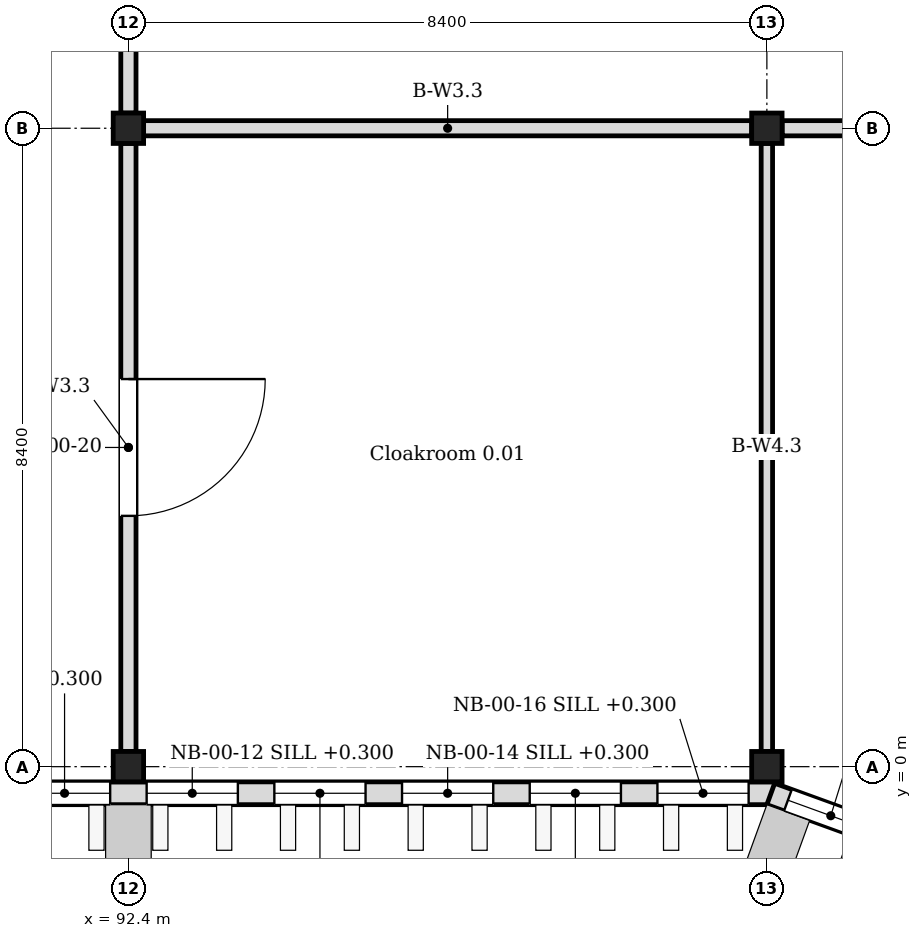
"""IFC4 building model, lengths in metres.
Left out: names, types, materials, properties, quantities, classifications, styles, units other than length and angle.
Written with IfcOpenShell. Run it as: python <this file> out.ifc"""

import sys

from ifc_helpers import new_model, si_unit, direction, frame, frame_2d, origin, origin_2d, place, context, subcontext, project, spatial, rectangle, i_section, extrude, element, fill, save


model = new_model("IFC4")
c1 = context("Model", 3, precision=1e-05, world=origin(), true_north=direction((0.0, 1.0)))
c2 = subcontext(c1, "Body", "Model", "MODEL_VIEW")
j1 = project(units=[si_unit("LENGTHUNIT", "METRE"), si_unit("PLANEANGLEUNIT", "RADIAN")], contexts=[c1])
p1 = place(None, origin())
s1 = spatial("IfcSite", under=j1, at=p1, CompositionType="ELEMENT")
p2 = place(p1, origin())
s2 = spatial("IfcBuilding", under=s1, at=p2, CompositionType="ELEMENT")
p3 = place(p2, origin())
s3 = spatial("IfcBuildingStorey", under=s2, at=p3, CompositionType="ELEMENT", Elevation=0.0)
for number, where, z_axis, x_axis in (
    (1, (92.4, 0.0, 0.0), (0.0, 0.0, 1.0), (1.0, 0.0, 0.0)),
    (2, (92.4, 8.4, 0.0), (0.0, 0.0, 1.0), (1.0, 0.0, 0.0)),
    (3, (100.8, 0.0, 0.0), (0.0, 0.0, 1.0), (1.0, 0.0, 0.0)),
    (4, (100.8, 8.4, 0.0), (0.0, 0.0, 1.0), (1.0, 0.0, 0.0)),
):
    element("IfcColumn", number, at=place(p3, frame(where, z_axis=z_axis, x_axis=x_axis)), inside=s3, PredefinedType="COLUMN", context=c2, shape_type="SweptSolid", body=[
        extrude(i_section(OverallWidth=0.4, OverallDepth=0.4, WebThickness=0.013, FlangeThickness=0.021, FilletRadius=0.022, at=origin_2d()), origin(), (0.0, 0.0, 1.0), 6.0),
    ])
p4 = place(p3, frame((67.1, -0.35, 0.0), z_axis=(0.0, 0.0, 1.0), x_axis=(1.0, 0.0, 0.0)))
e5 = element("IfcWall", 5, at=p4, inside=s3, PredefinedType="SOLIDWALL", context=c2, shape_type="SweptSolid", body=[
    extrude(rectangle(XDim=33.8, YDim=0.3, at=frame_2d((16.9, 0.0))), origin(), (0.0, 0.0, 1.0), 5.85),
])
p5 = place(p4, frame((3.1, 0.0, 0.0)))
e6 = element("IfcOpeningElement", 6, at=p5, cuts=e5, PredefinedType="OPENING", context=c2, shape_type="SweptSolid", body=[
    extrude(rectangle(XDim=2.4, YDim=2.6, at=frame_2d((1.2, 1.3))), frame((0.0, 0.16, 0.0), z_axis=(0.0, -1.0, 0.0), x_axis=(1.0, 0.0, 0.0)), (0.0, 0.0, 1.0), 0.32),
])
p6 = place(p4, frame((11.5, 0.0, 0.0)))
e7 = element("IfcOpeningElement", 7, at=p6, cuts=e5, PredefinedType="OPENING", context=c2, shape_type="SweptSolid", body=[
    extrude(rectangle(XDim=2.4, YDim=2.6, at=frame_2d((1.2, 1.3))), frame((0.0, 0.16, 0.0), z_axis=(0.0, -1.0, 0.0), x_axis=(1.0, 0.0, 0.0)), (0.0, 0.0, 1.0), 0.32),
])
p7 = place(p4, frame((19.9, 0.0, 0.0)))
e8 = element("IfcOpeningElement", 8, at=p7, cuts=e5, PredefinedType="OPENING", context=c2, shape_type="SweptSolid", body=[
    extrude(rectangle(XDim=2.4, YDim=2.6, at=frame_2d((1.2, 1.3))), frame((0.0, 0.16, 0.0), z_axis=(0.0, -1.0, 0.0), x_axis=(1.0, 0.0, 0.0)), (0.0, 0.0, 1.0), 0.32),
])
p8 = place(p4, frame((0.34, 0.0, 0.3)))
e9 = element("IfcOpeningElement", 9, at=p8, cuts=e5, PredefinedType="OPENING", context=c2, shape_type="SweptSolid", body=[
    extrude(rectangle(XDim=1.2, YDim=4.2, at=frame_2d((0.6, 2.1))), frame((0.0, 0.16, 0.0), z_axis=(0.0, -1.0, 0.0), x_axis=(1.0, 0.0, 0.0)), (0.0, 0.0, 1.0), 0.32),
])
p9 = place(p4, frame((7.06, 0.0, 0.3)))
e10 = element("IfcOpeningElement", 10, at=p9, cuts=e5, PredefinedType="OPENING", context=c2, shape_type="SweptSolid", body=[
    extrude(rectangle(XDim=1.2, YDim=4.2, at=frame_2d((0.6, 2.1))), frame((0.0, 0.16, 0.0), z_axis=(0.0, -1.0, 0.0), x_axis=(1.0, 0.0, 0.0)), (0.0, 0.0, 1.0), 0.32),
])
p10 = place(p4, frame((8.74, 0.0, 0.3)))
e11 = element("IfcOpeningElement", 11, at=p10, cuts=e5, PredefinedType="OPENING", context=c2, shape_type="SweptSolid", body=[
    extrude(rectangle(XDim=1.2, YDim=4.2, at=frame_2d((0.6, 2.1))), frame((0.0, 0.16, 0.0), z_axis=(0.0, -1.0, 0.0), x_axis=(1.0, 0.0, 0.0)), (0.0, 0.0, 1.0), 0.32),
])
p11 = place(p4, frame((15.46, 0.0, 0.3)))
e12 = element("IfcOpeningElement", 12, at=p11, cuts=e5, PredefinedType="OPENING", context=c2, shape_type="SweptSolid", body=[
    extrude(rectangle(XDim=1.2, YDim=4.2, at=frame_2d((0.6, 2.1))), frame((0.0, 0.16, 0.0), z_axis=(0.0, -1.0, 0.0), x_axis=(1.0, 0.0, 0.0)), (0.0, 0.0, 1.0), 0.32),
])
p12 = place(p4, frame((17.14, 0.0, 0.3)))
e13 = element("IfcOpeningElement", 13, at=p12, cuts=e5, PredefinedType="OPENING", context=c2, shape_type="SweptSolid", body=[
    extrude(rectangle(XDim=1.2, YDim=4.2, at=frame_2d((0.6, 2.1))), frame((0.0, 0.16, 0.0), z_axis=(0.0, -1.0, 0.0), x_axis=(1.0, 0.0, 0.0)), (0.0, 0.0, 1.0), 0.32),
])
p13 = place(p4, frame((23.86, 0.0, 0.3)))
e14 = element("IfcOpeningElement", 14, at=p13, cuts=e5, PredefinedType="OPENING", context=c2, shape_type="SweptSolid", body=[
    extrude(rectangle(XDim=1.2, YDim=4.2, at=frame_2d((0.6, 2.1))), frame((0.0, 0.16, 0.0), z_axis=(0.0, -1.0, 0.0), x_axis=(1.0, 0.0, 0.0)), (0.0, 0.0, 1.0), 0.32),
])
p14 = place(p4, frame((25.54, 0.0, 0.3)))
e15 = element("IfcOpeningElement", 15, at=p14, cuts=e5, PredefinedType="OPENING", context=c2, shape_type="SweptSolid", body=[
    extrude(rectangle(XDim=1.2, YDim=4.2, at=frame_2d((0.6, 2.1))), frame((0.0, 0.16, 0.0), z_axis=(0.0, -1.0, 0.0), x_axis=(1.0, 0.0, 0.0)), (0.0, 0.0, 1.0), 0.32),
])
p15 = place(p4, frame((27.22, 0.0, 0.3)))
e16 = element("IfcOpeningElement", 16, at=p15, cuts=e5, PredefinedType="OPENING", context=c2, shape_type="SweptSolid", body=[
    extrude(rectangle(XDim=1.2, YDim=4.2, at=frame_2d((0.6, 2.1))), frame((0.0, 0.16, 0.0), z_axis=(0.0, -1.0, 0.0), x_axis=(1.0, 0.0, 0.0)), (0.0, 0.0, 1.0), 0.32),
])
p16 = place(p4, frame((28.9, 0.0, 0.3)))
e17 = element("IfcOpeningElement", 17, at=p16, cuts=e5, PredefinedType="OPENING", context=c2, shape_type="SweptSolid", body=[
    extrude(rectangle(XDim=1.2, YDim=4.2, at=frame_2d((0.6, 2.1))), frame((0.0, 0.16, 0.0), z_axis=(0.0, -1.0, 0.0), x_axis=(1.0, 0.0, 0.0)), (0.0, 0.0, 1.0), 0.32),
])
p17 = place(p4, frame((30.58, 0.0, 0.3)))
e18 = element("IfcOpeningElement", 18, at=p17, cuts=e5, PredefinedType="OPENING", context=c2, shape_type="SweptSolid", body=[
    extrude(rectangle(XDim=1.2, YDim=4.2, at=frame_2d((0.6, 2.1))), frame((0.0, 0.16, 0.0), z_axis=(0.0, -1.0, 0.0), x_axis=(1.0, 0.0, 0.0)), (0.0, 0.0, 1.0), 0.32),
])
p18 = place(p4, frame((32.26, 0.0, 0.3)))
e19 = element("IfcOpeningElement", 19, at=p18, cuts=e5, PredefinedType="OPENING", context=c2, shape_type="SweptSolid", body=[
    extrude(rectangle(XDim=1.2, YDim=4.2, at=frame_2d((0.6, 2.1))), frame((0.0, 0.16, 0.0), z_axis=(0.0, -1.0, 0.0), x_axis=(1.0, 0.0, 0.0)), (0.0, 0.0, 1.0), 0.32),
])
p19 = place(p3, frame((100.851, -0.359, 0.0), z_axis=(0.0, 0.0, 1.0), x_axis=(0.939953187971, -0.341303390584, 0.0)))
e20 = element("IfcWall", 20, at=p19, inside=s3, PredefinedType="SOLIDWALL", context=c2, shape_type="SweptSolid", body=[
    extrude(rectangle(XDim=8.828, YDim=0.3, at=frame_2d((4.414, 0.0))), origin(), (0.0, 0.0, 1.0), 5.85),
])
p20 = place(p19, frame((3.268, 0.0, 0.0)))
e21 = element("IfcOpeningElement", 21, at=p20, cuts=e20, PredefinedType="OPENING", context=c2, shape_type="SweptSolid", body=[
    extrude(rectangle(XDim=2.4, YDim=2.6, at=frame_2d((1.2, 1.3))), frame((0.0, 0.16, 0.0), z_axis=(0.0, -1.0, 0.0), x_axis=(1.0, 0.0, 0.0)), (0.0, 0.0, 1.0), 0.32),
])
p21 = place(p19, frame((0.24, 0.0, 0.3)))
e22 = element("IfcOpeningElement", 22, at=p21, cuts=e20, PredefinedType="OPENING", context=c2, shape_type="SweptSolid", body=[
    extrude(rectangle(XDim=1.2, YDim=4.2, at=frame_2d((0.6, 2.1))), frame((0.0, 0.16, 0.0), z_axis=(0.0, -1.0, 0.0), x_axis=(1.0, 0.0, 0.0)), (0.0, 0.0, 1.0), 0.32),
])
p22 = place(p19, frame((6.96, 0.0, 0.3)))
e23 = element("IfcOpeningElement", 23, at=p22, cuts=e20, PredefinedType="OPENING", context=c2, shape_type="SweptSolid", body=[
    extrude(rectangle(XDim=1.2, YDim=4.2, at=frame_2d((0.6, 2.1))), frame((0.0, 0.16, 0.0), z_axis=(0.0, -1.0, 0.0), x_axis=(1.0, 0.0, 0.0)), (0.0, 0.0, 1.0), 0.32),
])
p23 = place(p3, frame((92.6, 8.4, 0.0), z_axis=(0.0, 0.0, 1.0), x_axis=(1.0, 0.0, 0.0)))
e24 = element("IfcWall", 24, at=p23, inside=s3, PredefinedType="PARTITIONING", context=c2, shape_type="SweptSolid", body=[
    extrude(rectangle(XDim=8.0, YDim=0.2, at=frame_2d((4.0, 0.0))), origin(), (0.0, 0.0, 1.0), 5.05),
])
p24 = place(p3, frame((101.0, 8.4, 0.0), z_axis=(0.0, 0.0, 1.0), x_axis=(1.0, 0.0, 0.0)))
e25 = element("IfcWall", 25, at=p24, inside=s3, PredefinedType="PARTITIONING", context=c2, shape_type="SweptSolid", body=[
    extrude(rectangle(XDim=8.0, YDim=0.2, at=frame_2d((4.0, 0.0))), origin(), (0.0, 0.0, 1.0), 5.05),
])
p25 = place(p24, frame((3.0, 0.0, 0.0)))
e26 = element("IfcOpeningElement", 26, at=p25, cuts=e25, PredefinedType="OPENING", context=c2, shape_type="SweptSolid", body=[
    extrude(rectangle(XDim=2.0, YDim=2.7, at=frame_2d((1.0, 1.35))), frame((0.0, 0.11, 0.0), z_axis=(0.0, -1.0, 0.0), x_axis=(1.0, 0.0, 0.0)), (0.0, 0.0, 1.0), 0.22),
])
p26 = place(p3, frame((92.4, 0.2, 0.0), z_axis=(0.0, 0.0, 1.0), x_axis=(0.0, 1.0, 0.0)))
e27 = element("IfcWall", 27, at=p26, inside=s3, PredefinedType="PARTITIONING", context=c2, shape_type="SweptSolid", body=[
    extrude(rectangle(XDim=8.0, YDim=0.2, at=frame_2d((4.0, 0.0))), origin(), (0.0, 0.0, 1.0), 5.05),
])
p27 = place(p26, frame((3.1, 0.0, 0.0)))
e28 = element("IfcOpeningElement", 28, at=p27, cuts=e27, PredefinedType="OPENING", context=c2, shape_type="SweptSolid", body=[
    extrude(rectangle(XDim=1.8, YDim=2.1, at=frame_2d((0.9, 1.05))), frame((0.0, 0.11, 0.0), z_axis=(0.0, -1.0, 0.0), x_axis=(1.0, 0.0, 0.0)), (0.0, 0.0, 1.0), 0.22),
])
p28 = place(p3, frame((92.4, 8.6, 0.0), z_axis=(0.0, 0.0, 1.0), x_axis=(0.0, 1.0, 0.0)))
e29 = element("IfcWall", 29, at=p28, inside=s3, PredefinedType="PARTITIONING", context=c2, shape_type="SweptSolid", body=[
    extrude(rectangle(XDim=8.0, YDim=0.2, at=frame_2d((4.0, 0.0))), origin(), (0.0, 0.0, 1.0), 5.05),
])
p29 = place(p28, frame((2.8, 0.0, 0.0)))
e30 = element("IfcOpeningElement", 30, at=p29, cuts=e29, PredefinedType="OPENING", context=c2, shape_type="SweptSolid", body=[
    extrude(rectangle(XDim=2.4, YDim=2.2, at=frame_2d((1.2, 1.1))), frame((0.0, 0.11, 0.0), z_axis=(0.0, -1.0, 0.0), x_axis=(1.0, 0.0, 0.0)), (0.0, 0.0, 1.0), 0.22),
])
p30 = place(p3, frame((100.8, 0.2, 0.0), z_axis=(0.0, 0.0, 1.0), x_axis=(0.0, 1.0, 0.0)))
e31 = element("IfcWall", 31, at=p30, inside=s3, PredefinedType="PARTITIONING", context=c2, shape_type="SweptSolid", body=[
    extrude(rectangle(XDim=8.0, YDim=0.15, at=frame_2d((4.0, 0.0))), origin(), (0.0, 0.0, 1.0), 5.05),
])
p31 = place(p13, origin())
e32 = element("IfcWindow", 32, at=p31, inside=s3, PartitioningType="TRIPLE_PANEL_VERTICAL", PredefinedType="WINDOW", context=c2, shape_type="SweptSolid", body=[
    extrude(rectangle(XDim=1.2, YDim=4.2, at=frame_2d((0.6, 2.1))), frame((0.0, 0.03, 0.0), z_axis=(0.0, -1.0, 0.0), x_axis=(1.0, 0.0, 0.0)), (0.0, 0.0, 1.0), 0.06),
])
fill(e14, e32)
p32 = place(p14, origin())
e33 = element("IfcWindow", 33, at=p32, inside=s3, PartitioningType="TRIPLE_PANEL_VERTICAL", PredefinedType="WINDOW", context=c2, shape_type="SweptSolid", body=[
    extrude(rectangle(XDim=1.2, YDim=4.2, at=frame_2d((0.6, 2.1))), frame((0.0, 0.03, 0.0), z_axis=(0.0, -1.0, 0.0), x_axis=(1.0, 0.0, 0.0)), (0.0, 0.0, 1.0), 0.06),
])
fill(e15, e33)
p33 = place(p15, origin())
e34 = element("IfcWindow", 34, at=p33, inside=s3, PartitioningType="TRIPLE_PANEL_VERTICAL", PredefinedType="WINDOW", context=c2, shape_type="SweptSolid", body=[
    extrude(rectangle(XDim=1.2, YDim=4.2, at=frame_2d((0.6, 2.1))), frame((0.0, 0.03, 0.0), z_axis=(0.0, -1.0, 0.0), x_axis=(1.0, 0.0, 0.0)), (0.0, 0.0, 1.0), 0.06),
])
fill(e16, e34)
p34 = place(p16, origin())
e35 = element("IfcWindow", 35, at=p34, inside=s3, PartitioningType="TRIPLE_PANEL_VERTICAL", PredefinedType="WINDOW", context=c2, shape_type="SweptSolid", body=[
    extrude(rectangle(XDim=1.2, YDim=4.2, at=frame_2d((0.6, 2.1))), frame((0.0, 0.03, 0.0), z_axis=(0.0, -1.0, 0.0), x_axis=(1.0, 0.0, 0.0)), (0.0, 0.0, 1.0), 0.06),
])
fill(e17, e35)
p35 = place(p17, origin())
e36 = element("IfcWindow", 36, at=p35, inside=s3, PartitioningType="TRIPLE_PANEL_VERTICAL", PredefinedType="WINDOW", context=c2, shape_type="SweptSolid", body=[
    extrude(rectangle(XDim=1.2, YDim=4.2, at=frame_2d((0.6, 2.1))), frame((0.0, 0.03, 0.0), z_axis=(0.0, -1.0, 0.0), x_axis=(1.0, 0.0, 0.0)), (0.0, 0.0, 1.0), 0.06),
])
fill(e18, e36)
p36 = place(p18, origin())
e37 = element("IfcWindow", 37, at=p36, inside=s3, PartitioningType="TRIPLE_PANEL_VERTICAL", PredefinedType="WINDOW", context=c2, shape_type="SweptSolid", body=[
    extrude(rectangle(XDim=1.2, YDim=4.2, at=frame_2d((0.6, 2.1))), frame((0.0, 0.03, 0.0), z_axis=(0.0, -1.0, 0.0), x_axis=(1.0, 0.0, 0.0)), (0.0, 0.0, 1.0), 0.06),
])
fill(e19, e37)
p37 = place(p21, origin())
e38 = element("IfcWindow", 38, at=p37, inside=s3, PartitioningType="TRIPLE_PANEL_VERTICAL", PredefinedType="WINDOW", context=c2, shape_type="SweptSolid", body=[
    extrude(rectangle(XDim=1.2, YDim=4.2, at=frame_2d((0.6, 2.1))), frame((0.0, 0.03, 0.0), z_axis=(0.0, -1.0, 0.0), x_axis=(1.0, 0.0, 0.0)), (0.0, 0.0, 1.0), 0.06),
])
fill(e22, e38)
p38 = place(p27, origin())
e39 = element("IfcDoor", 39, at=p38, inside=s3, OperationType="DOUBLE_DOOR_SINGLE_SWING", PredefinedType="DOOR", context=c2, shape_type="SweptSolid", body=[
    extrude(rectangle(XDim=1.8, YDim=2.1, at=frame_2d((0.9, 1.05))), frame((0.0, 0.025, 0.0), z_axis=(0.0, -1.0, 0.0), x_axis=(1.0, 0.0, 0.0)), (0.0, 0.0, 1.0), 0.05),
])
fill(e28, e39)
save(model, sys.argv[1])
